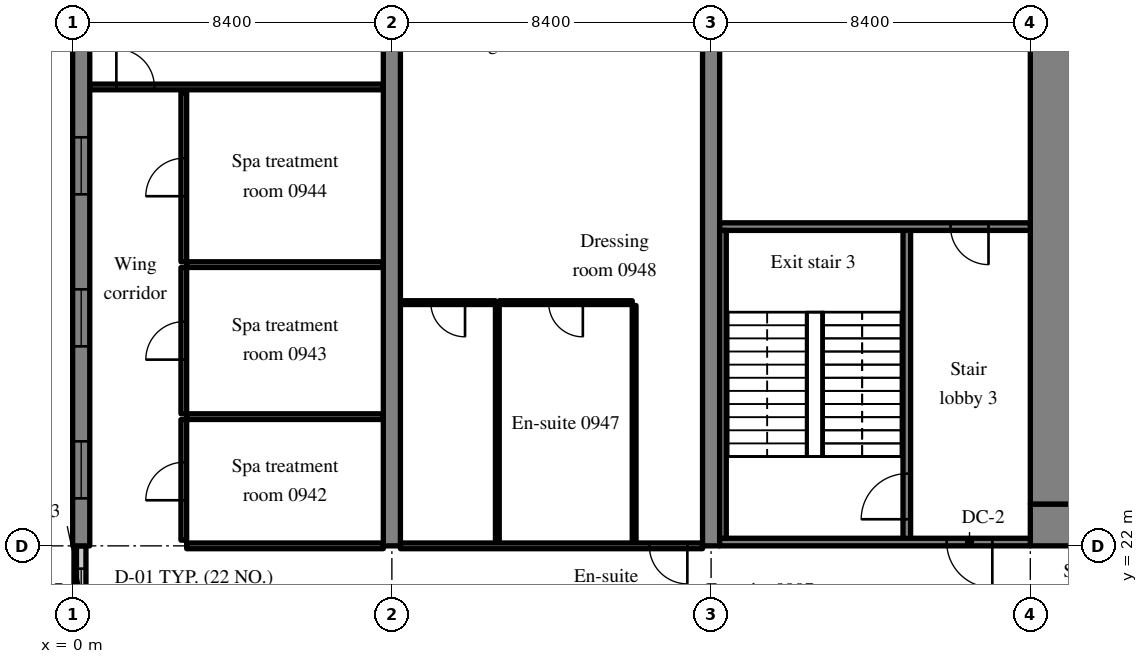
"""IFC4 building model, lengths in metres.
Left out: names, types, materials, properties, quantities, classifications, styles, units other than length and angle.
Written with IfcOpenShell. Run it as: python <this file> out.ifc"""

import sys

from ifc_helpers import new_model, si_unit, direction, frame, frame_2d, origin, place, context, subcontext, project, spatial, rectangle, extrude, source, transform, mapped, element, fill, save


model = new_model("IFC4")
c1 = context("Model", 3, precision=1e-05, world=origin(), true_north=direction((0.0, 1.0)))
c2 = subcontext(c1, "Body", "Model", "MODEL_VIEW")
j1 = project(units=[si_unit("LENGTHUNIT", "METRE"), si_unit("PLANEANGLEUNIT", "RADIAN")], contexts=[c1])
p1 = place(None, origin())
s1 = spatial("IfcSite", under=j1, at=p1, CompositionType="ELEMENT")
p2 = place(p1, origin())
s2 = spatial("IfcBuilding", under=s1, at=p2, CompositionType="ELEMENT")
p3 = place(p2, frame((0.0, 0.0, 43.0)))
s3 = spatial("IfcBuildingStorey", under=s2, at=p3, CompositionType="ELEMENT", Elevation=43.0)
m1 = source(origin(), c2, "Body", "SweptSolid", [
    extrude(rectangle(XDim=50.4, YDim=1.1, at=frame_2d((25.2, 0.0))), origin(), (0.0, 0.0, 1.0), 3.52),
])
p4 = place(p3, frame((25.2, 22.55, 0.0), z_axis=(0.0, 0.0, 1.0), x_axis=(1.0, 0.0, 0.0)))
e1 = element("IfcWall", 1, at=p4, inside=s3, PredefinedType="SHEAR", context=c2, shape_type="MappedRepresentation", body=[
    mapped(m1, transform((0.0, 0.0, 0.0), scale=1.0)),
])
m2 = source(origin(), c2, "Body", "SweptSolid", [
    extrude(rectangle(XDim=1.8, YDim=2.1, at=frame_2d((0.9, 1.05))), frame((0.0, 0.56, 0.0), z_axis=(0.0, -1.0, 0.0), x_axis=(1.0, 0.0, 0.0)), (0.0, 0.0, 1.0), 1.12),
])
p5 = place(p4, frame((15.9, 0.0, 0.0)))
e2 = element("IfcOpeningElement", 2, at=p5, cuts=e1, PredefinedType="OPENING", context=c2, shape_type="MappedRepresentation", body=[
    mapped(m2, transform((0.0, 0.0, 0.0), scale=1.0)),
])
m3 = source(origin(), c2, "Body", "SweptSolid", [
    extrude(rectangle(XDim=1.2, YDim=2.1, at=frame_2d((0.6, 1.05))), frame((0.0, 0.56, 0.0), z_axis=(0.0, -1.0, 0.0), x_axis=(1.0, 0.0, 0.0)), (0.0, 0.0, 1.0), 1.12),
])
p6 = place(p4, frame((27.0, 0.0, 0.0)))
e3 = element("IfcOpeningElement", 3, at=p6, cuts=e1, PredefinedType="OPENING", context=c2, shape_type="MappedRepresentation", body=[
    mapped(m3, transform((0.0, 0.0, 0.0), scale=1.0)),
])
m4 = source(origin(), c2, "Body", "SweptSolid", [
    extrude(rectangle(XDim=0.9, YDim=2.1, at=frame_2d((0.45, 1.05))), frame((0.0, 0.56, 0.0), z_axis=(0.0, -1.0, 0.0), x_axis=(1.0, 0.0, 0.0)), (0.0, 0.0, 1.0), 1.12),
])
p7 = place(p4, frame((33.75, 0.0, 0.0)))
e4 = element("IfcOpeningElement", 4, at=p7, cuts=e1, PredefinedType="OPENING", context=c2, shape_type="MappedRepresentation", body=[
    mapped(m4, transform((0.0, 0.0, 0.0), scale=1.0)),
])
p8 = place(p4, frame((30.75, 0.0, 0.0)))
e5 = element("IfcOpeningElement", 5, at=p8, cuts=e1, PredefinedType="OPENING", context=c2, shape_type="MappedRepresentation", body=[
    mapped(m4, transform((0.0, 0.0, 0.0), scale=1.0)),
])
p9 = place(p4, frame((39.75, 0.0, 0.0)))
e6 = element("IfcOpeningElement", 6, at=p9, cuts=e1, PredefinedType="OPENING", context=c2, shape_type="MappedRepresentation", body=[
    mapped(m4, transform((0.0, 0.0, 0.0), scale=1.0)),
])
p10 = place(p4, frame((36.75, 0.0, 0.0)))
e7 = element("IfcOpeningElement", 7, at=p10, cuts=e1, PredefinedType="OPENING", context=c2, shape_type="MappedRepresentation", body=[
    mapped(m4, transform((0.0, 0.0, 0.0), scale=1.0)),
])
p11 = place(p4, frame((6.425, 0.0, 0.0)))
e8 = element("IfcOpeningElement", 8, at=p11, cuts=e1, PredefinedType="OPENING", context=c2, shape_type="MappedRepresentation", body=[
    mapped(m3, transform((0.0, 0.0, 0.0), scale=1.0)),
])
p12 = place(p4, frame((47.675, 0.0, 0.0)))
e9 = element("IfcOpeningElement", 9, at=p12, cuts=e1, PredefinedType="OPENING", context=c2, shape_type="MappedRepresentation", body=[
    mapped(m3, transform((0.0, 0.0, 0.0), scale=1.0)),
])
m5 = source(origin(), c2, "Body", "SweptSolid", [
    extrude(rectangle(XDim=17.8, YDim=1.1, at=frame_2d((8.9, 0.0))), origin(), (0.0, 0.0, 1.0), 3.52),
])
p13 = place(p3, frame((25.75, 23.1, 0.0), z_axis=(0.0, 0.0, 1.0), x_axis=(0.0, 1.0, 0.0)))
e10 = element("IfcWall", 10, at=p13, inside=s3, PredefinedType="SHEAR", context=c2, shape_type="MappedRepresentation", body=[
    mapped(m5, transform((0.0, 0.0, 0.0), scale=1.0)),
])
m6 = source(origin(), c2, "Body", "SweptSolid", [
    extrude(rectangle(XDim=16.0, YDim=0.45, at=frame_2d((8.0, 0.0))), origin(), (0.0, 0.0, 1.0), 3.52),
])
p14 = place(p3, frame((0.225, 22.0, 0.0), z_axis=(0.0, 0.0, 1.0), x_axis=(0.0, 1.0, 0.0)))
e11 = element("IfcWall", 11, at=p14, inside=s3, PredefinedType="SHEAR", context=c2, shape_type="MappedRepresentation", body=[
    mapped(m6, transform((0.0, 0.0, 0.0), scale=1.0)),
])
m7 = source(origin(), c2, "Body", "SweptSolid", [
    extrude(rectangle(XDim=1.5, YDim=1.5, at=frame_2d((0.75, 0.75))), frame((0.0, 0.235, 0.0), z_axis=(0.0, -1.0, 0.0), x_axis=(1.0, 0.0, 0.0)), (0.0, 0.0, 1.0), 0.47),
])
p15 = place(p14, frame((1.25, 0.0, 0.9)))
e12 = element("IfcOpeningElement", 12, at=p15, cuts=e11, PredefinedType="OPENING", context=c2, shape_type="MappedRepresentation", body=[
    mapped(m7, transform((0.0, 0.0, 0.0), scale=1.0)),
])
p16 = place(p14, frame((5.25, 0.0, 0.9)))
e13 = element("IfcOpeningElement", 13, at=p16, cuts=e11, PredefinedType="OPENING", context=c2, shape_type="MappedRepresentation", body=[
    mapped(m7, transform((0.0, 0.0, 0.0), scale=1.0)),
])
p17 = place(p14, frame((9.25, 0.0, 0.9)))
e14 = element("IfcOpeningElement", 14, at=p17, cuts=e11, PredefinedType="OPENING", context=c2, shape_type="MappedRepresentation", body=[
    mapped(m7, transform((0.0, 0.0, 0.0), scale=1.0)),
])
p18 = place(p14, frame((13.25, 0.0, 0.9)))
e15 = element("IfcOpeningElement", 15, at=p18, cuts=e11, PredefinedType="OPENING", context=c2, shape_type="MappedRepresentation", body=[
    mapped(m7, transform((0.0, 0.0, 0.0), scale=1.0)),
])
m8 = source(origin(), c2, "Body", "SweptSolid", [
    extrude(rectangle(XDim=20.0, YDim=0.45, at=frame_2d((10.0, 0.0))), origin(), (0.0, 0.0, 1.0), 3.52),
])
for number, where, z_axis, x_axis in (
    (16, (8.4, 22.0, 0.0), (0.0, 0.0, 1.0), (0.0, 1.0, 0.0)),
    (17, (16.8, 22.0, 0.0), (0.0, 0.0, 1.0), (0.0, 1.0, 0.0)),
):
    element("IfcWall", number, at=place(p3, frame(where, z_axis=z_axis, x_axis=x_axis)), inside=s3, PredefinedType="SHEAR", context=c2, shape_type="MappedRepresentation", body=[
        mapped(m8, transform((0.0, 0.0, 0.0), scale=1.0)),
    ])
m9 = source(origin(), c2, "Body", "SweptSolid", [
    extrude(rectangle(XDim=2.4, YDim=0.25, at=frame_2d((1.2, 0.0))), origin(), (0.0, 0.0, 1.0), 2.62),
])
p19 = place(p3, frame((0.225, 19.6, 0.0), z_axis=(0.0, 0.0, 1.0), x_axis=(0.0, 1.0, 0.0)))
e18 = element("IfcWall", 18, at=p19, inside=s3, PredefinedType="SOLIDWALL", context=c2, shape_type="MappedRepresentation", body=[
    mapped(m9, transform((0.0, 0.0, 0.0), scale=1.0)),
])
m10 = source(origin(), c2, "Body", "SweptSolid", [
    extrude(rectangle(XDim=1.2, YDim=1.5, at=frame_2d((0.6, 0.75))), frame((0.0, 0.135, 0.0), z_axis=(0.0, -1.0, 0.0), x_axis=(1.0, 0.0, 0.0)), (0.0, 0.0, 1.0), 0.27),
])
p20 = place(p19, frame((0.6, 0.0, 0.9)))
e19 = element("IfcOpeningElement", 19, at=p20, cuts=e18, PredefinedType="OPENING", context=c2, shape_type="MappedRepresentation", body=[
    mapped(m10, transform((0.0, 0.0, 0.0), scale=1.0)),
])
m11 = source(origin(), c2, "Body", "SweptSolid", [
    extrude(rectangle(XDim=8.3, YDim=0.2, at=frame_2d((4.15, 0.0))), origin(), (0.0, 0.0, 1.0), 3.52),
])
p21 = place(p3, frame((21.95, 22.1, 0.0), z_axis=(0.0, 0.0, 1.0), x_axis=(0.0, 1.0, 0.0)))
e20 = element("IfcWall", 20, at=p21, inside=s3, PredefinedType="SOLIDWALL", context=c2, shape_type="MappedRepresentation", body=[
    mapped(m11, transform((0.0, 0.0, 0.0), scale=1.0)),
])
m12 = source(origin(), c2, "Body", "SweptSolid", [
    extrude(rectangle(XDim=1.2, YDim=2.1, at=frame_2d((0.6, 1.05))), frame((0.0, 0.11, 0.0), z_axis=(0.0, -1.0, 0.0), x_axis=(1.0, 0.0, 0.0)), (0.0, 0.0, 1.0), 0.22),
])
p22 = place(p21, frame((0.6, 0.0, 0.0)))
e21 = element("IfcOpeningElement", 21, at=p22, cuts=e20, PredefinedType="OPENING", context=c2, shape_type="MappedRepresentation", body=[
    mapped(m12, transform((0.0, 0.0, 0.0), scale=1.0)),
])
m13 = source(origin(), c2, "Body", "SweptSolid", [
    extrude(rectangle(XDim=8.175, YDim=0.2, at=frame_2d((4.087, 0.0))), origin(), (0.0, 0.0, 1.0), 3.52),
])
p23 = place(p3, frame((17.025, 22.1, 0.0), z_axis=(0.0, 0.0, 1.0), x_axis=(1.0, 0.0, 0.0)))
e22 = element("IfcWall", 22, at=p23, inside=s3, PredefinedType="SOLIDWALL", context=c2, shape_type="MappedRepresentation", body=[
    mapped(m13, transform((0.0, 0.0, 0.0), scale=1.0)),
])
p24 = place(p23, frame((5.975, 0.0, 0.0)))
e23 = element("IfcOpeningElement", 23, at=p24, cuts=e22, PredefinedType="OPENING", context=c2, shape_type="MappedRepresentation", body=[
    mapped(m12, transform((0.0, 0.0, 0.0), scale=1.0)),
])
p25 = place(p3, frame((17.025, 30.4, 0.0), z_axis=(0.0, 0.0, 1.0), x_axis=(1.0, 0.0, 0.0)))
e24 = element("IfcWall", 24, at=p25, inside=s3, PredefinedType="SOLIDWALL", context=c2, shape_type="MappedRepresentation", body=[
    mapped(m13, transform((0.0, 0.0, 0.0), scale=1.0)),
])
m14 = source(origin(), c2, "Body", "SweptSolid", [
    extrude(rectangle(XDim=1.0, YDim=2.1, at=frame_2d((0.5, 1.05))), frame((0.0, 0.11, 0.0), z_axis=(0.0, -1.0, 0.0), x_axis=(1.0, 0.0, 0.0)), (0.0, 0.0, 1.0), 0.22),
])
p26 = place(p25, frame((6.075, 0.0, 0.0)))
e25 = element("IfcOpeningElement", 25, at=p26, cuts=e24, PredefinedType="OPENING", context=c2, shape_type="MappedRepresentation", body=[
    mapped(m14, transform((0.0, 0.0, 0.0), scale=1.0)),
])
m15 = source(origin(), c2, "Body", "SweptSolid", [
    extrude(rectangle(XDim=8.1, YDim=0.175, at=frame_2d((4.05, 0.0))), origin(), (0.0, 0.0, 1.0), 3.52),
])
p27 = place(p3, frame((17.112, 22.2, 0.0), z_axis=(0.0, 0.0, 1.0), x_axis=(0.0, 1.0, 0.0)))
e26 = element("IfcWall", 26, at=p27, inside=s3, PredefinedType="SOLIDWALL", context=c2, shape_type="MappedRepresentation", body=[
    mapped(m15, transform((0.0, 0.0, 0.0), scale=1.0)),
])
m16 = source(origin(), c2, "Body", "SweptSolid", [
    extrude(rectangle(XDim=5.175, YDim=0.15, at=frame_2d((2.587, 0.0))), origin(), (0.0, 0.0, 1.0), 2.82),
])
p28 = place(p3, frame((3.0, 22.0, 0.0), z_axis=(0.0, 0.0, 1.0), x_axis=(1.0, 0.0, 0.0)))
e27 = element("IfcWall", 27, at=p28, inside=s3, PredefinedType="PARTITIONING", context=c2, shape_type="MappedRepresentation", body=[
    mapped(m16, transform((0.0, 0.0, 0.0), scale=1.0)),
])
m17 = source(origin(), c2, "Body", "SweptSolid", [
    extrude(rectangle(XDim=3.175, YDim=0.15, at=frame_2d((1.587, 0.0))), origin(), (0.0, 0.0, 1.0), 3.52),
])
p29 = place(p3, frame((2.925, 22.15, 0.0), z_axis=(0.0, 0.0, 1.0), x_axis=(0.0, 1.0, 0.0)))
e28 = element("IfcWall", 28, at=p29, inside=s3, PredefinedType="PARTITIONING", context=c2, shape_type="MappedRepresentation", body=[
    mapped(m17, transform((0.0, 0.0, 0.0), scale=1.0)),
])
m18 = source(origin(), c2, "Body", "SweptSolid", [
    extrude(rectangle(XDim=1.0, YDim=2.1, at=frame_2d((0.5, 1.05))), frame((0.0, 0.085, 0.0), z_axis=(0.0, -1.0, 0.0), x_axis=(1.0, 0.0, 0.0)), (0.0, 0.0, 1.0), 0.17),
])
p30 = place(p29, frame((1.05, 0.0, 0.0)))
e29 = element("IfcOpeningElement", 29, at=p30, cuts=e28, PredefinedType="OPENING", context=c2, shape_type="MappedRepresentation", body=[
    mapped(m18, transform((0.0, 0.0, 0.0), scale=1.0)),
])
m19 = source(origin(), c2, "Body", "SweptSolid", [
    extrude(rectangle(XDim=5.175, YDim=0.15, at=frame_2d((2.587, 0.0))), origin(), (0.0, 0.0, 1.0), 3.52),
])
p31 = place(p3, frame((3.0, 25.4, 0.0), z_axis=(0.0, 0.0, 1.0), x_axis=(1.0, 0.0, 0.0)))
e30 = element("IfcWall", 30, at=p31, inside=s3, PredefinedType="PARTITIONING", context=c2, shape_type="MappedRepresentation", body=[
    mapped(m19, transform((0.0, 0.0, 0.0), scale=1.0)),
])
m20 = source(origin(), c2, "Body", "SweptSolid", [
    extrude(rectangle(XDim=3.85, YDim=0.15, at=frame_2d((1.925, 0.0))), origin(), (0.0, 0.0, 1.0), 3.52),
])
p32 = place(p3, frame((2.925, 25.475, 0.0), z_axis=(0.0, 0.0, 1.0), x_axis=(0.0, 1.0, 0.0)))
e31 = element("IfcWall", 31, at=p32, inside=s3, PredefinedType="PARTITIONING", context=c2, shape_type="MappedRepresentation", body=[
    mapped(m20, transform((0.0, 0.0, 0.0), scale=1.0)),
])
p33 = place(p32, frame((1.425, 0.0, 0.0)))
e32 = element("IfcOpeningElement", 32, at=p33, cuts=e31, PredefinedType="OPENING", context=c2, shape_type="MappedRepresentation", body=[
    mapped(m18, transform((0.0, 0.0, 0.0), scale=1.0)),
])
p34 = place(p3, frame((3.0, 29.4, 0.0), z_axis=(0.0, 0.0, 1.0), x_axis=(1.0, 0.0, 0.0)))
e33 = element("IfcWall", 33, at=p34, inside=s3, PredefinedType="PARTITIONING", context=c2, shape_type="MappedRepresentation", body=[
    mapped(m19, transform((0.0, 0.0, 0.0), scale=1.0)),
])
m21 = source(origin(), c2, "Body", "SweptSolid", [
    extrude(rectangle(XDim=4.45, YDim=0.15, at=frame_2d((2.225, 0.0))), origin(), (0.0, 0.0, 1.0), 3.52),
])
p35 = place(p3, frame((2.925, 29.475, 0.0), z_axis=(0.0, 0.0, 1.0), x_axis=(0.0, 1.0, 0.0)))
e34 = element("IfcWall", 34, at=p35, inside=s3, PredefinedType="PARTITIONING", context=c2, shape_type="MappedRepresentation", body=[
    mapped(m21, transform((0.0, 0.0, 0.0), scale=1.0)),
])
p36 = place(p35, frame((1.725, 0.0, 0.0)))
e35 = element("IfcOpeningElement", 35, at=p36, cuts=e34, PredefinedType="OPENING", context=c2, shape_type="MappedRepresentation", body=[
    mapped(m18, transform((0.0, 0.0, 0.0), scale=1.0)),
])
m22 = source(origin(), c2, "Body", "SweptSolid", [
    extrude(rectangle(XDim=7.725, YDim=0.15, at=frame_2d((3.863, 0.0))), origin(), (0.0, 0.0, 1.0), 3.52),
])
p37 = place(p3, frame((0.45, 34.075, 0.0), z_axis=(0.0, 0.0, 1.0), x_axis=(1.0, 0.0, 0.0)))
e36 = element("IfcWall", 36, at=p37, inside=s3, PredefinedType="PARTITIONING", context=c2, shape_type="MappedRepresentation", body=[
    mapped(m22, transform((0.0, 0.0, 0.0), scale=1.0)),
])
p38 = place(p37, frame((0.7, 0.0, 0.0)))
e37 = element("IfcOpeningElement", 37, at=p38, cuts=e36, PredefinedType="OPENING", context=c2, shape_type="MappedRepresentation", body=[
    mapped(m18, transform((0.0, 0.0, 0.0), scale=1.0)),
])
m23 = source(origin(), c2, "Body", "SweptSolid", [
    extrude(rectangle(XDim=6.25, YDim=0.1, at=frame_2d((3.125, 0.0))), origin(), (0.0, 0.0, 1.0), 3.52),
])
for number, where, z_axis, x_axis in (
    (38, (14.775, 22.075, 0.0), (0.0, 0.0, 1.0), (0.0, 1.0, 0.0)),
    (39, (11.175, 22.075, 0.0), (0.0, 0.0, 1.0), (0.0, 1.0, 0.0)),
):
    element("IfcWall", number, at=place(p3, frame(where, z_axis=z_axis, x_axis=x_axis)), inside=s3, PredefinedType="PARTITIONING", context=c2, shape_type="MappedRepresentation", body=[
        mapped(m23, transform((0.0, 0.0, 0.0), scale=1.0)),
    ])
m24 = source(origin(), c2, "Body", "SweptSolid", [
    extrude(rectangle(XDim=3.5, YDim=0.1, at=frame_2d((1.75, 0.0))), origin(), (0.0, 0.0, 1.0), 3.52),
])
p39 = place(p3, frame((11.225, 28.4, 0.0), z_axis=(0.0, 0.0, 1.0), x_axis=(1.0, 0.0, 0.0)))
e40 = element("IfcWall", 40, at=p39, inside=s3, PredefinedType="PARTITIONING", context=c2, shape_type="MappedRepresentation", body=[
    mapped(m24, transform((0.0, 0.0, 0.0), scale=1.0)),
])
m25 = source(origin(), c2, "Body", "SweptSolid", [
    extrude(rectangle(XDim=0.9, YDim=2.1, at=frame_2d((0.45, 1.05))), frame((0.0, 0.06, 0.0), z_axis=(0.0, -1.0, 0.0), x_axis=(1.0, 0.0, 0.0)), (0.0, 0.0, 1.0), 0.12),
])
p40 = place(p39, frame((1.3, 0.0, 0.0)))
e41 = element("IfcOpeningElement", 41, at=p40, cuts=e40, PredefinedType="OPENING", context=c2, shape_type="MappedRepresentation", body=[
    mapped(m25, transform((0.0, 0.0, 0.0), scale=1.0)),
])
m26 = source(origin(), c2, "Body", "SweptSolid", [
    extrude(rectangle(XDim=2.5, YDim=0.1, at=frame_2d((1.25, 0.0))), origin(), (0.0, 0.0, 1.0), 3.52),
])
p41 = place(p3, frame((8.625, 28.4, 0.0), z_axis=(0.0, 0.0, 1.0), x_axis=(1.0, 0.0, 0.0)))
e42 = element("IfcWall", 42, at=p41, inside=s3, PredefinedType="PARTITIONING", context=c2, shape_type="MappedRepresentation", body=[
    mapped(m26, transform((0.0, 0.0, 0.0), scale=1.0)),
])
p42 = place(p41, frame((0.8, 0.0, 0.0)))
e43 = element("IfcOpeningElement", 43, at=p42, cuts=e42, PredefinedType="OPENING", context=c2, shape_type="MappedRepresentation", body=[
    mapped(m25, transform((0.0, 0.0, 0.0), scale=1.0)),
])
m27 = source(origin(), c2, "Body", "SweptSolid", [
    extrude(rectangle(XDim=7.95, YDim=0.15, at=frame_2d((3.975, 0.0))), origin(), (0.0, 0.0, 1.0), 2.82),
])
p43 = place(p3, frame((8.625, 22.0, 0.0), z_axis=(0.0, 0.0, 1.0), x_axis=(1.0, 0.0, 0.0)))
e44 = element("IfcWall", 44, at=p43, inside=s3, PredefinedType="PARTITIONING", context=c2, shape_type="MappedRepresentation", body=[
    mapped(m27, transform((0.0, 0.0, 0.0), scale=1.0)),
])
p44 = place(p43, frame((6.55, 0.0, 0.0)))
e45 = element("IfcOpeningElement", 45, at=p44, cuts=e44, PredefinedType="OPENING", context=c2, shape_type="MappedRepresentation", body=[
    mapped(m18, transform((0.0, 0.0, 0.0), scale=1.0)),
])
m28 = source(origin(), c2, "Body", "SweptSolid", [
    extrude(rectangle(XDim=1.5, YDim=1.5, at=frame_2d((0.75, 0.75))), frame((0.0, 0.03, 0.0), z_axis=(0.0, -1.0, 0.0), x_axis=(1.0, 0.0, 0.0)), (0.0, 0.0, 1.0), 0.06),
])
p45 = place(p15, origin())
e46 = element("IfcWindow", 46, at=p45, inside=s3, PartitioningType="SINGLE_PANEL", PredefinedType="WINDOW", context=c2, shape_type="MappedRepresentation", body=[
    mapped(m28, transform((0.0, 0.0, 0.0), scale=1.0)),
])
fill(e12, e46)
p46 = place(p16, origin())
e47 = element("IfcWindow", 47, at=p46, inside=s3, PartitioningType="SINGLE_PANEL", PredefinedType="WINDOW", context=c2, shape_type="MappedRepresentation", body=[
    mapped(m28, transform((0.0, 0.0, 0.0), scale=1.0)),
])
fill(e13, e47)
p47 = place(p17, origin())
e48 = element("IfcWindow", 48, at=p47, inside=s3, PartitioningType="SINGLE_PANEL", PredefinedType="WINDOW", context=c2, shape_type="MappedRepresentation", body=[
    mapped(m28, transform((0.0, 0.0, 0.0), scale=1.0)),
])
fill(e14, e48)
m29 = source(origin(), c2, "Body", "SweptSolid", [
    extrude(rectangle(XDim=1.2, YDim=1.5, at=frame_2d((0.6, 0.75))), frame((0.0, 0.03, 0.0), z_axis=(0.0, -1.0, 0.0), x_axis=(1.0, 0.0, 0.0)), (0.0, 0.0, 1.0), 0.06),
])
p48 = place(p20, origin())
e49 = element("IfcWindow", 49, at=p48, inside=s3, PartitioningType="SINGLE_PANEL", PredefinedType="WINDOW", context=c2, shape_type="MappedRepresentation", body=[
    mapped(m29, transform((0.0, 0.0, 0.0), scale=1.0)),
])
fill(e19, e49)
m30 = source(origin(), c2, "Body", "SweptSolid", [
    extrude(rectangle(XDim=1.2, YDim=2.1, at=frame_2d((0.6, 1.05))), frame((0.0, 0.025, 0.0), z_axis=(0.0, -1.0, 0.0), x_axis=(1.0, 0.0, 0.0)), (0.0, 0.0, 1.0), 0.05),
])
p49 = place(p22, origin())
e50 = element("IfcDoor", 50, at=p49, inside=s3, OperationType="SINGLE_SWING_LEFT", PredefinedType="DOOR", context=c2, shape_type="MappedRepresentation", body=[
    mapped(m30, transform((0.0, 0.0, 0.0), scale=1.0)),
])
fill(e21, e50)
p50 = place(p24, origin())
e51 = element("IfcDoor", 51, at=p50, inside=s3, OperationType="SINGLE_SWING_RIGHT", PredefinedType="DOOR", context=c2, shape_type="MappedRepresentation", body=[
    mapped(m30, transform((0.0, 0.0, 0.0), scale=1.0)),
])
fill(e23, e51)
m31 = source(origin(), c2, "Body", "SweptSolid", [
    extrude(rectangle(XDim=1.0, YDim=2.1, at=frame_2d((0.5, 1.05))), frame((0.0, 0.025, 0.0), z_axis=(0.0, -1.0, 0.0), x_axis=(1.0, 0.0, 0.0)), (0.0, 0.0, 1.0), 0.05),
])
p51 = place(p26, origin())
e52 = element("IfcDoor", 52, at=p51, inside=s3, OperationType="SINGLE_SWING_RIGHT", PredefinedType="DOOR", context=c2, shape_type="MappedRepresentation", body=[
    mapped(m31, transform((0.0, 0.0, 0.0), scale=1.0)),
])
fill(e25, e52)
p52 = place(p30, origin())
e53 = element("IfcDoor", 53, at=p52, inside=s3, OperationType="SINGLE_SWING_LEFT", PredefinedType="DOOR", context=c2, shape_type="MappedRepresentation", body=[
    mapped(m31, transform((0.0, 0.0, 0.0), scale=1.0)),
])
fill(e29, e53)
p53 = place(p33, origin())
e54 = element("IfcDoor", 54, at=p53, inside=s3, OperationType="SINGLE_SWING_LEFT", PredefinedType="DOOR", context=c2, shape_type="MappedRepresentation", body=[
    mapped(m31, transform((0.0, 0.0, 0.0), scale=1.0)),
])
fill(e32, e54)
p54 = place(p36, origin())
e55 = element("IfcDoor", 55, at=p54, inside=s3, OperationType="SINGLE_SWING_LEFT", PredefinedType="DOOR", context=c2, shape_type="MappedRepresentation", body=[
    mapped(m31, transform((0.0, 0.0, 0.0), scale=1.0)),
])
fill(e35, e55)
p55 = place(p38, origin())
e56 = element("IfcDoor", 56, at=p55, inside=s3, OperationType="SINGLE_SWING_LEFT", PredefinedType="DOOR", context=c2, shape_type="MappedRepresentation", body=[
    mapped(m31, transform((0.0, 0.0, 0.0), scale=1.0)),
])
fill(e37, e56)
m32 = source(origin(), c2, "Body", "SweptSolid", [
    extrude(rectangle(XDim=0.9, YDim=2.1, at=frame_2d((0.45, 1.05))), frame((0.0, 0.025, 0.0), z_axis=(0.0, -1.0, 0.0), x_axis=(1.0, 0.0, 0.0)), (0.0, 0.0, 1.0), 0.05),
])
p56 = place(p40, origin())
e57 = element("IfcDoor", 57, at=p56, inside=s3, OperationType="SINGLE_SWING_RIGHT", PredefinedType="DOOR", context=c2, shape_type="MappedRepresentation", body=[
    mapped(m32, transform((0.0, 0.0, 0.0), scale=1.0)),
])
fill(e41, e57)
p57 = place(p42, origin())
e58 = element("IfcDoor", 58, at=p57, inside=s3, OperationType="SINGLE_SWING_RIGHT", PredefinedType="DOOR", context=c2, shape_type="MappedRepresentation", body=[
    mapped(m32, transform((0.0, 0.0, 0.0), scale=1.0)),
])
fill(e43, e58)
p58 = place(p44, origin())
e59 = element("IfcDoor", 59, at=p58, inside=s3, OperationType="SINGLE_SWING_RIGHT", PredefinedType="DOOR", context=c2, shape_type="MappedRepresentation", body=[
    mapped(m31, transform((0.0, 0.0, 0.0), scale=1.0)),
])
fill(e45, e59)
save(model, sys.argv[1])
